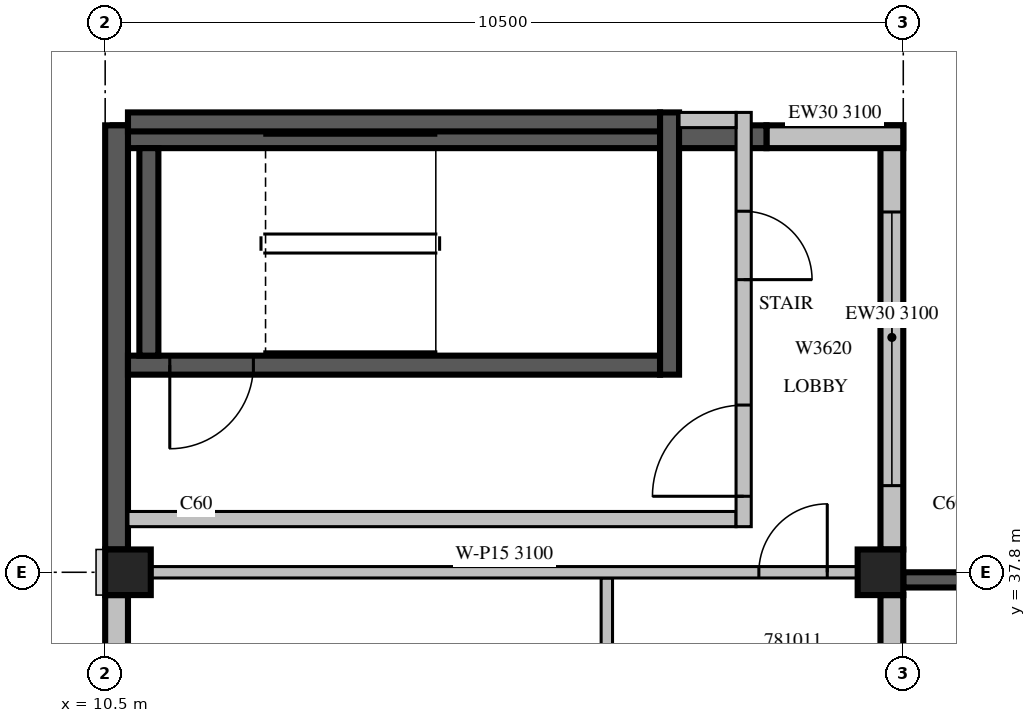
"""IFC4 building model, lengths in metres.
Left out: names, types, materials, properties, quantities, classifications, styles, units other than length and angle.
Written with IfcOpenShell. Run it as: python <this file> out.ifc"""

import sys

from ifc_helpers import new_model, si_unit, direction, frame, frame_2d, origin, origin_2d, place, context, subcontext, project, spatial, rectangle, extrude, source, transform, mapped, element, fill, save


model = new_model("IFC4")
c1 = context("Model", 3, precision=1e-05, world=origin(), true_north=direction((0.0, 1.0)))
c2 = subcontext(c1, "Body", "Model", "MODEL_VIEW")
j1 = project(units=[si_unit("LENGTHUNIT", "METRE"), si_unit("PLANEANGLEUNIT", "RADIAN")], contexts=[c1])
p1 = place(None, origin())
s1 = spatial("IfcSite", under=j1, at=p1, CompositionType="ELEMENT")
p2 = place(p1, origin())
s2 = spatial("IfcBuilding", under=s1, at=p2, CompositionType="ELEMENT")
p3 = place(p2, frame((0.0, 0.0, 344.0)))
s3 = spatial("IfcBuildingStorey", under=s2, at=p3, CompositionType="ELEMENT", Elevation=344.0)
m1 = source(origin(), c2, "Body", "SweptSolid", [
    extrude(rectangle(XDim=0.6, YDim=0.6, at=origin_2d()), origin(), (0.0, 0.0, 1.0), 3.5),
])
for number, where, z_axis, x_axis in (
    (1, (10.8, 37.8, 0.0), (0.0, 0.0, 1.0), (1.0, 0.0, 0.0)),
    (2, (20.7, 37.8, 0.0), (0.0, 0.0, 1.0), (1.0, 0.0, 0.0)),
):
    element("IfcColumn", number, at=place(p3, frame(where, z_axis=z_axis, x_axis=x_axis)), inside=s3, PredefinedType="COLUMN", context=c2, shape_type="MappedRepresentation", body=[
        mapped(m1, transform((0.0, 0.0, 0.0), scale=1.0)),
    ])
m2 = source(origin(), c2, "Body", "SweptSolid", [
    extrude(rectangle(XDim=3.9, YDim=0.2, at=frame_2d((1.95, 0.0))), origin(), (0.0, 0.0, 1.0), 3.1),
])
p4 = place(p3, frame((21.0, 37.7, 0.0), z_axis=(0.0, 0.0, 1.0), x_axis=(1.0, 0.0, 0.0)))
e3 = element("IfcWall", 3, at=p4, inside=s3, PredefinedType="SOLIDWALL", context=c2, shape_type="MappedRepresentation", body=[
    mapped(m2, transform((0.0, 0.0, 0.0), scale=1.0)),
])
m3 = source(origin(), c2, "Body", "SweptSolid", [
    extrude(rectangle(XDim=2.4, YDim=2.0, at=frame_2d((1.2, 1.0))), frame((0.0, 0.11, 0.0), z_axis=(0.0, -1.0, 0.0), x_axis=(1.0, 0.0, 0.0)), (0.0, 0.0, 1.0), 0.22),
])
p5 = place(p4, frame((0.75, 0.0, 0.6)))
e4 = element("IfcOpeningElement", 4, at=p5, cuts=e3, PredefinedType="OPENING", context=c2, shape_type="MappedRepresentation", body=[
    mapped(m3, transform((0.0, 0.0, 0.0), scale=1.0)),
])
m4 = source(origin(), c2, "Body", "SweptSolid", [
    extrude(rectangle(XDim=7.8, YDim=0.3, at=frame_2d((3.9, 0.0))), origin(), (0.0, 0.0, 1.0), 3.1),
])
p6 = place(p3, frame((20.85, 29.7, 0.0), z_axis=(0.0, 0.0, 1.0), x_axis=(0.0, 1.0, 0.0)))
e5 = element("IfcWall", 5, at=p6, inside=s3, PredefinedType="STANDARD", context=c2, shape_type="MappedRepresentation", body=[
    mapped(m4, transform((0.0, 0.0, 0.0), scale=1.0)),
])
m5 = source(origin(), c2, "Body", "SweptSolid", [
    extrude(rectangle(XDim=1.0, YDim=2.1, at=frame_2d((0.5, 1.05))), frame((0.0, 0.16, 0.0), z_axis=(0.0, -1.0, 0.0), x_axis=(1.0, 0.0, 0.0)), (0.0, 0.0, 1.0), 0.32),
])
p7 = place(p6, frame((1.767, 0.0, 0.0)))
e6 = element("IfcOpeningElement", 6, at=p7, cuts=e5, PredefinedType="OPENING", context=c2, shape_type="MappedRepresentation", body=[
    mapped(m5, transform((0.0, 0.0, 0.0), scale=1.0)),
])
m6 = source(origin(), c2, "Body", "SweptSolid", [
    extrude(rectangle(XDim=5.58, YDim=0.3, at=frame_2d((2.79, 0.0))), origin(), (0.0, 0.0, 1.0), 3.1),
])
p8 = place(p3, frame((20.85, 38.1, 0.0), z_axis=(0.0, 0.0, 1.0), x_axis=(0.0, 1.0, 0.0)))
e7 = element("IfcWall", 7, at=p8, inside=s3, PredefinedType="STANDARD", context=c2, shape_type="MappedRepresentation", body=[
    mapped(m6, transform((0.0, 0.0, 0.0), scale=1.0)),
])
m7 = source(origin(), c2, "Body", "SweptSolid", [
    extrude(rectangle(XDim=3.6, YDim=2.0, at=frame_2d((1.8, 1.0))), frame((0.0, 0.16, 0.0), z_axis=(0.0, -1.0, 0.0), x_axis=(1.0, 0.0, 0.0)), (0.0, 0.0, 1.0), 0.32),
])
p9 = place(p8, frame((0.84, 0.0, 0.6)))
e8 = element("IfcOpeningElement", 8, at=p9, cuts=e7, PredefinedType="OPENING", context=c2, shape_type="MappedRepresentation", body=[
    mapped(m7, transform((0.0, 0.0, 0.0), scale=1.0)),
])
m8 = source(origin(), c2, "Body", "SweptSolid", [
    extrude(rectangle(XDim=1.8, YDim=0.3, at=frame_2d((0.9, 0.0))), origin(), (0.0, 0.0, 1.0), 3.1),
])
p10 = place(p3, frame((21.0, 43.53, 0.0), z_axis=(0.0, 0.0, 1.0), x_axis=(-1.0, 0.0, 0.0)))
e9 = element("IfcWall", 9, at=p10, inside=s3, PredefinedType="STANDARD", context=c2, shape_type="MappedRepresentation", body=[
    mapped(m8, transform((0.0, 0.0, 0.0), scale=1.0)),
])
m9 = source(origin(), c2, "Body", "SweptSolid", [
    extrude(rectangle(XDim=8.6, YDim=0.3, at=frame_2d((4.3, 0.0))), origin(), (0.0, 0.0, 1.0), 3.1),
])
p11 = place(p3, frame((19.2, 43.53, 0.0), z_axis=(0.0, 0.0, 1.0), x_axis=(-1.0, 0.0, 0.0)))
e10 = element("IfcWall", 10, at=p11, inside=s3, PredefinedType="SOLIDWALL", context=c2, shape_type="MappedRepresentation", body=[
    mapped(m9, transform((0.0, 0.0, 0.0), scale=1.0)),
])
m10 = source(origin(), c2, "Body", "SweptSolid", [
    extrude(rectangle(XDim=5.58, YDim=0.3, at=frame_2d((2.79, 0.0))), origin(), (0.0, 0.0, 1.0), 3.1),
])
p12 = place(p3, frame((10.65, 43.68, 0.0), z_axis=(0.0, 0.0, 1.0), x_axis=(0.0, -1.0, 0.0)))
e11 = element("IfcWall", 11, at=p12, inside=s3, PredefinedType="SOLIDWALL", context=c2, shape_type="MappedRepresentation", body=[
    mapped(m10, transform((0.0, 0.0, 0.0), scale=1.0)),
])
m11 = source(origin(), c2, "Body", "SweptSolid", [
    extrude(rectangle(XDim=7.8, YDim=0.3, at=frame_2d((3.9, 0.0))), origin(), (0.0, 0.0, 1.0), 2.6),
])
p13 = place(p3, frame((10.65, 37.5, 0.0), z_axis=(0.0, 0.0, 1.0), x_axis=(0.0, -1.0, 0.0)))
e12 = element("IfcWall", 12, at=p13, inside=s3, PredefinedType="STANDARD", context=c2, shape_type="MappedRepresentation", body=[
    mapped(m11, transform((0.0, 0.0, 0.0), scale=1.0)),
])
m12 = source(origin(), c2, "Body", "SweptSolid", [
    extrude(rectangle(XDim=1.2, YDim=2.0, at=frame_2d((0.6, 1.0))), frame((0.0, 0.16, 0.0), z_axis=(0.0, -1.0, 0.0), x_axis=(1.0, 0.0, 0.0)), (0.0, 0.0, 1.0), 0.32),
])
p14 = place(p13, frame((4.348, 0.0, 0.6)))
e13 = element("IfcOpeningElement", 13, at=p14, cuts=e12, PredefinedType="OPENING", context=c2, shape_type="MappedRepresentation", body=[
    mapped(m12, transform((0.0, 0.0, 0.0), scale=1.0)),
])
m13 = source(origin(), c2, "Body", "SweptSolid", [
    extrude(rectangle(XDim=2.4, YDim=2.0, at=frame_2d((1.2, 1.0))), frame((0.0, 0.16, 0.0), z_axis=(0.0, -1.0, 0.0), x_axis=(1.0, 0.0, 0.0)), (0.0, 0.0, 1.0), 0.32),
])
p15 = place(p13, frame((0.974, 0.0, 0.6)))
e14 = element("IfcOpeningElement", 14, at=p15, cuts=e12, PredefinedType="OPENING", context=c2, shape_type="MappedRepresentation", body=[
    mapped(m13, transform((0.0, 0.0, 0.0), scale=1.0)),
])
m14 = source(origin(), c2, "Body", "SweptSolid", [
    extrude(rectangle(XDim=7.0, YDim=0.25, at=frame_2d((3.5, 0.0))), origin(), (0.0, 0.0, 1.0), 3.1),
])
p16 = place(p3, frame((10.8, 40.525, 0.0), z_axis=(0.0, 0.0, 1.0), x_axis=(1.0, 0.0, 0.0)))
e15 = element("IfcWall", 15, at=p16, inside=s3, PredefinedType="SOLIDWALL", context=c2, shape_type="MappedRepresentation", body=[
    mapped(m14, transform((0.0, 0.0, 0.0), scale=1.0)),
])
m15 = source(origin(), c2, "Body", "SweptSolid", [
    extrude(rectangle(XDim=1.1, YDim=2.1, at=frame_2d((0.55, 1.05))), frame((0.0, 0.135, 0.0), z_axis=(0.0, -1.0, 0.0), x_axis=(1.0, 0.0, 0.0)), (0.0, 0.0, 1.0), 0.27),
])
p17 = place(p16, frame((0.55, 0.0, 0.0)))
e16 = element("IfcOpeningElement", 16, at=p17, cuts=e15, PredefinedType="OPENING", context=c2, shape_type="MappedRepresentation", body=[
    mapped(m15, transform((0.0, 0.0, 0.0), scale=1.0)),
])
p18 = place(p3, frame((10.8, 43.725, 0.0), z_axis=(0.0, 0.0, 1.0), x_axis=(1.0, 0.0, 0.0)))
e17 = element("IfcWall", 17, at=p18, inside=s3, PredefinedType="SOLIDWALL", context=c2, shape_type="MappedRepresentation", body=[
    mapped(m14, transform((0.0, 0.0, 0.0), scale=1.0)),
])
m16 = source(origin(), c2, "Body", "SweptSolid", [
    extrude(rectangle(XDim=3.45, YDim=0.25, at=frame_2d((1.725, 0.0))), origin(), (0.0, 0.0, 1.0), 3.1),
])
p19 = place(p3, frame((17.925, 40.4, 0.0), z_axis=(0.0, 0.0, 1.0), x_axis=(0.0, 1.0, 0.0)))
e18 = element("IfcWall", 18, at=p19, inside=s3, PredefinedType="SOLIDWALL", context=c2, shape_type="MappedRepresentation", body=[
    mapped(m16, transform((0.0, 0.0, 0.0), scale=1.0)),
])
m17 = source(origin(), c2, "Body", "SweptSolid", [
    extrude(rectangle(XDim=2.73, YDim=0.25, at=frame_2d((1.365, 0.0))), origin(), (0.0, 0.0, 1.0), 3.1),
])
p20 = place(p3, frame((11.075, 40.65, 0.0), z_axis=(0.0, 0.0, 1.0), x_axis=(0.0, 1.0, 0.0)))
e19 = element("IfcWall", 19, at=p20, inside=s3, PredefinedType="SOLIDWALL", context=c2, shape_type="MappedRepresentation", body=[
    mapped(m17, transform((0.0, 0.0, 0.0), scale=1.0)),
])
m18 = source(origin(), c2, "Body", "SweptSolid", [
    extrude(rectangle(XDim=8.0, YDim=0.2, at=frame_2d((4.0, 0.0))), origin(), (0.0, 0.0, 1.0), 3.1),
])
p21 = place(p3, frame((10.8, 38.5, 0.0), z_axis=(0.0, 0.0, 1.0), x_axis=(1.0, 0.0, 0.0)))
e20 = element("IfcWall", 20, at=p21, inside=s3, PredefinedType="PARTITIONING", context=c2, shape_type="MappedRepresentation", body=[
    mapped(m18, transform((0.0, 0.0, 0.0), scale=1.0)),
])
m19 = source(origin(), c2, "Body", "SweptSolid", [
    extrude(rectangle(XDim=5.45, YDim=0.2, at=frame_2d((2.725, 0.0))), origin(), (0.0, 0.0, 1.0), 3.1),
])
p22 = place(p3, frame((18.9, 38.4, 0.0), z_axis=(0.0, 0.0, 1.0), x_axis=(0.0, 1.0, 0.0)))
e21 = element("IfcWall", 21, at=p22, inside=s3, PredefinedType="PARTITIONING", context=c2, shape_type="MappedRepresentation", body=[
    mapped(m19, transform((0.0, 0.0, 0.0), scale=1.0)),
])
m20 = source(origin(), c2, "Body", "SweptSolid", [
    extrude(rectangle(XDim=1.2, YDim=2.1, at=frame_2d((0.6, 1.05))), frame((0.0, 0.11, 0.0), z_axis=(0.0, -1.0, 0.0), x_axis=(1.0, 0.0, 0.0)), (0.0, 0.0, 1.0), 0.22),
])
p23 = place(p22, frame((0.4, 0.0, 0.0)))
e22 = element("IfcOpeningElement", 22, at=p23, cuts=e21, PredefinedType="OPENING", context=c2, shape_type="MappedRepresentation", body=[
    mapped(m20, transform((0.0, 0.0, 0.0), scale=1.0)),
])
m21 = source(origin(), c2, "Body", "SweptSolid", [
    extrude(rectangle(XDim=0.9, YDim=2.1, at=frame_2d((0.45, 1.05))), frame((0.0, 0.11, 0.0), z_axis=(0.0, -1.0, 0.0), x_axis=(1.0, 0.0, 0.0)), (0.0, 0.0, 1.0), 0.22),
])
p24 = place(p22, frame((3.25, 0.0, 0.0)))
e23 = element("IfcOpeningElement", 23, at=p24, cuts=e21, PredefinedType="OPENING", context=c2, shape_type="MappedRepresentation", body=[
    mapped(m21, transform((0.0, 0.0, 0.0), scale=1.0)),
])
m22 = source(origin(), c2, "Body", "SweptSolid", [
    extrude(rectangle(XDim=0.75, YDim=0.2, at=frame_2d((0.375, 0.0))), origin(), (0.0, 0.0, 1.0), 3.1),
])
p25 = place(p3, frame((18.05, 43.75, 0.0), z_axis=(0.0, 0.0, 1.0), x_axis=(1.0, 0.0, 0.0)))
e24 = element("IfcWall", 24, at=p25, inside=s3, PredefinedType="PARTITIONING", context=c2, shape_type="MappedRepresentation", body=[
    mapped(m22, transform((0.0, 0.0, 0.0), scale=1.0)),
])
m23 = source(origin(), c2, "Body", "SweptSolid", [
    extrude(rectangle(XDim=4.105, YDim=0.15, at=frame_2d((2.053, 0.0))), origin(), (0.0, 0.0, 1.0), 2.6),
])
p26 = place(p3, frame((17.1, 37.725, 0.0), z_axis=(0.0, 0.0, 1.0), x_axis=(0.0, -1.0, 0.0)))
e25 = element("IfcWall", 25, at=p26, inside=s3, PredefinedType="PARTITIONING", context=c2, shape_type="MappedRepresentation", body=[
    mapped(m23, transform((0.0, 0.0, 0.0), scale=1.0)),
])
m24 = source(origin(), c2, "Body", "SweptSolid", [
    extrude(rectangle(XDim=1.0, YDim=2.1, at=frame_2d((0.5, 1.05))), frame((0.0, 0.085, 0.0), z_axis=(0.0, -1.0, 0.0), x_axis=(1.0, 0.0, 0.0)), (0.0, 0.0, 1.0), 0.17),
])
p27 = place(p26, frame((1.525, 0.0, 0.0)))
e26 = element("IfcOpeningElement", 26, at=p27, cuts=e25, PredefinedType="OPENING", context=c2, shape_type="MappedRepresentation", body=[
    mapped(m24, transform((0.0, 0.0, 0.0), scale=1.0)),
])
m25 = source(origin(), c2, "Body", "SweptSolid", [
    extrude(rectangle(XDim=9.302, YDim=0.15, at=frame_2d((4.651, 0.0))), origin(), (0.0, 0.0, 1.0), 3.1),
])
p28 = place(p3, frame((20.401, 37.8, 0.0), z_axis=(0.0, 0.0, 1.0), x_axis=(-1.0, 0.0, 0.0)))
e27 = element("IfcWall", 27, at=p28, inside=s3, PredefinedType="PARTITIONING", context=c2, shape_type="MappedRepresentation", body=[
    mapped(m25, transform((0.0, 0.0, 0.0), scale=1.0)),
])
m26 = source(origin(), c2, "Body", "SweptSolid", [
    extrude(rectangle(XDim=0.9, YDim=2.1, at=frame_2d((0.45, 1.05))), frame((0.0, 0.085, 0.0), z_axis=(0.0, -1.0, 0.0), x_axis=(1.0, 0.0, 0.0)), (0.0, 0.0, 1.0), 0.17),
])
p29 = place(p28, frame((0.401, 0.0, 0.0)))
e28 = element("IfcOpeningElement", 28, at=p29, cuts=e27, PredefinedType="OPENING", context=c2, shape_type="MappedRepresentation", body=[
    mapped(m26, transform((0.0, 0.0, 0.0), scale=1.0)),
])
m27 = source(origin(), c2, "Body", "SweptSolid", [
    extrude(rectangle(XDim=3.6, YDim=2.0, at=frame_2d((1.8, 1.0))), frame((0.0, 0.03, 0.0), z_axis=(0.0, -1.0, 0.0), x_axis=(1.0, 0.0, 0.0)), (0.0, 0.0, 1.0), 0.06),
])
p30 = place(p9, origin())
e29 = element("IfcWindow", 29, at=p30, inside=s3, PartitioningType="SINGLE_PANEL", PredefinedType="WINDOW", context=c2, shape_type="MappedRepresentation", body=[
    mapped(m27, transform((0.0, 0.0, 0.0), scale=1.0)),
])
fill(e8, e29)
m28 = source(origin(), c2, "Body", "SweptSolid", [
    extrude(rectangle(XDim=1.1, YDim=2.1, at=frame_2d((0.55, 1.05))), frame((0.0, 0.025, 0.0), z_axis=(0.0, -1.0, 0.0), x_axis=(1.0, 0.0, 0.0)), (0.0, 0.0, 1.0), 0.05),
])
p31 = place(p17, origin())
e30 = element("IfcDoor", 30, at=p31, inside=s3, OperationType="SINGLE_SWING_RIGHT", PredefinedType="DOOR", context=c2, shape_type="MappedRepresentation", body=[
    mapped(m28, transform((0.0, 0.0, 0.0), scale=1.0)),
])
fill(e16, e30)
m29 = source(origin(), c2, "Body", "SweptSolid", [
    extrude(rectangle(XDim=1.2, YDim=2.1, at=frame_2d((0.6, 1.05))), frame((0.0, 0.025, 0.0), z_axis=(0.0, -1.0, 0.0), x_axis=(1.0, 0.0, 0.0)), (0.0, 0.0, 1.0), 0.05),
])
p32 = place(p23, origin())
e31 = element("IfcDoor", 31, at=p32, inside=s3, OperationType="SINGLE_SWING_LEFT", PredefinedType="DOOR", context=c2, shape_type="MappedRepresentation", body=[
    mapped(m29, transform((0.0, 0.0, 0.0), scale=1.0)),
])
fill(e22, e31)
m30 = source(origin(), c2, "Body", "SweptSolid", [
    extrude(rectangle(XDim=0.9, YDim=2.1, at=frame_2d((0.45, 1.05))), frame((0.0, 0.025, 0.0), z_axis=(0.0, -1.0, 0.0), x_axis=(1.0, 0.0, 0.0)), (0.0, 0.0, 1.0), 0.05),
])
p33 = place(p24, origin())
e32 = element("IfcDoor", 32, at=p33, inside=s3, OperationType="SINGLE_SWING_RIGHT", PredefinedType="DOOR", context=c2, shape_type="MappedRepresentation", body=[
    mapped(m30, transform((0.0, 0.0, 0.0), scale=1.0)),
])
fill(e23, e32)
p34 = place(p29, origin())
e33 = element("IfcDoor", 33, at=p34, inside=s3, OperationType="SINGLE_SWING_RIGHT", PredefinedType="DOOR", context=c2, shape_type="MappedRepresentation", body=[
    mapped(m30, transform((0.0, 0.0, 0.0), scale=1.0)),
])
fill(e28, e33)
save(model, sys.argv[1])
